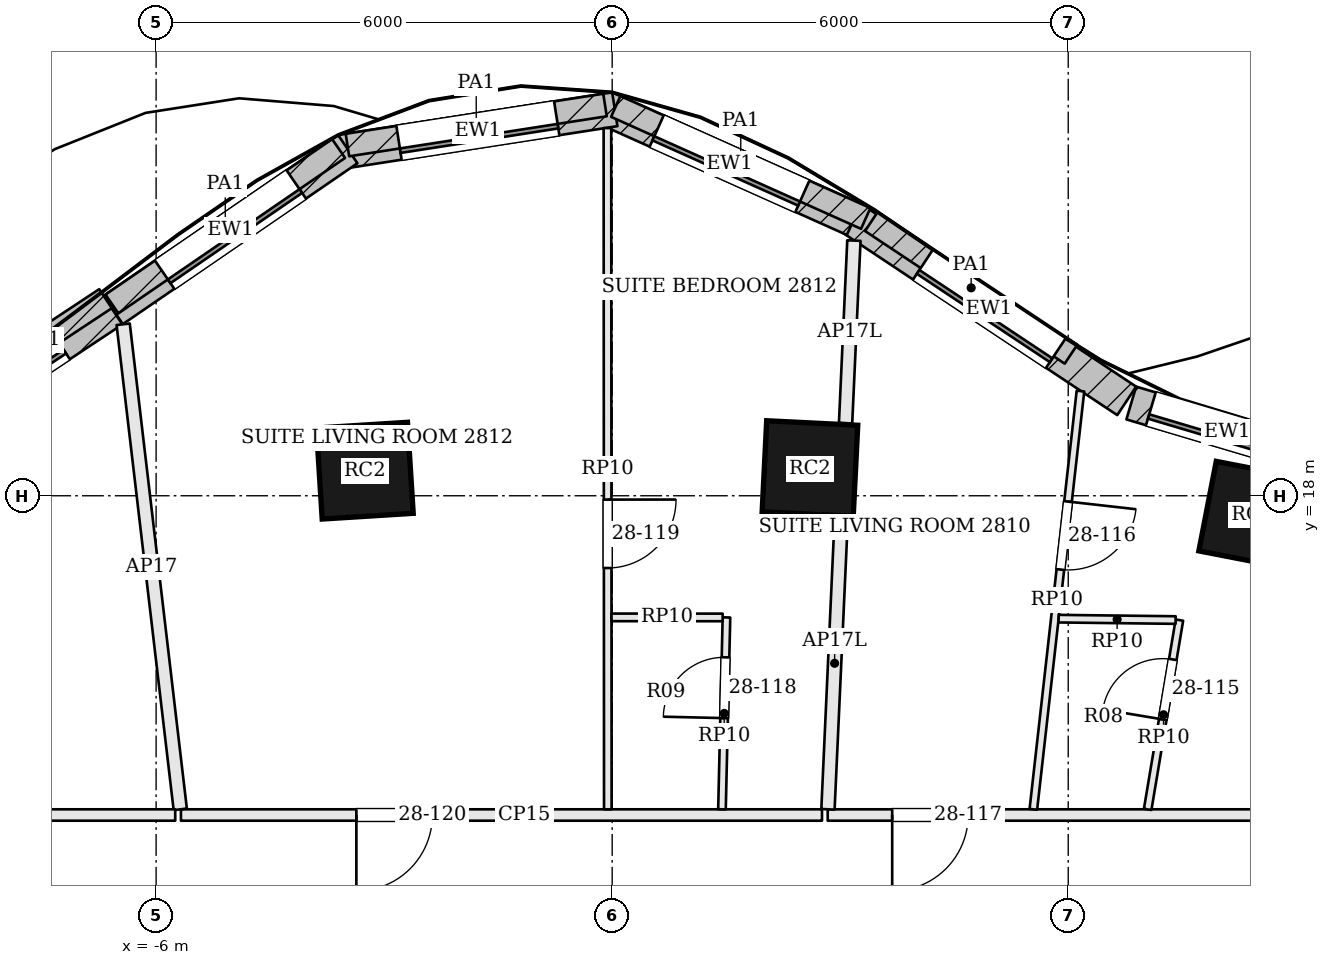
"""IFC4 building model, lengths in metres.
Left out: names, types, materials, properties, quantities, classifications, styles, units other than length and angle.
Written with IfcOpenShell. Run it as: python <this file> out.ifc"""

import sys

from ifc_helpers import new_model, si_unit, direction, frame, frame_2d, origin, origin_2d, place, context, subcontext, project, spatial, rectangle, extrude, element, fill, save


model = new_model("IFC4")
c1 = context("Model", 3, precision=1e-05, world=origin(), true_north=direction((0.0, 1.0)))
c2 = subcontext(c1, "Body", "Model", "MODEL_VIEW")
j1 = project(units=[si_unit("LENGTHUNIT", "METRE"), si_unit("PLANEANGLEUNIT", "RADIAN")], contexts=[c1])
p1 = place(None, origin())
s1 = spatial("IfcSite", under=j1, at=p1, CompositionType="ELEMENT")
p2 = place(p1, origin())
s2 = spatial("IfcBuilding", under=s1, at=p2, CompositionType="ELEMENT")
p3 = place(p2, frame((0.0, 0.0, 117.6)))
s3 = spatial("IfcBuildingStorey", under=s2, at=p3, CompositionType="ELEMENT", Elevation=117.6)
for number, where, z_axis, x_axis in (
    (1, (8.422, 17.749, 0.0), (0.0, 0.0, 1.0), (-0.982, 0.191, 0.0)),
    (2, (2.602, 18.358, 0.0), (0.0, 0.0, 1.0), (-0.999, 0.05, 0.0)),
    (3, (-3.254, 18.33, 0.0), (0.0, 0.0, 1.0), (-0.998, -0.063, 0.0)),
):
    element("IfcColumn", number, at=place(p3, frame(where, z_axis=z_axis, x_axis=x_axis)), inside=s3, PredefinedType="COLUMN", context=c2, shape_type="SweptSolid", body=[
        extrude(rectangle(XDim=1.2, YDim=1.2, at=origin_2d()), origin(), (0.0, 0.0, 1.0), 2.8),
    ])
p4 = place(p3, frame((9.357, 18.469, 0.0), z_axis=(0.0, 0.0, 1.0), x_axis=(-0.958524054629, 0.285011643091, 0.0)))
e4 = element("IfcWall", 4, at=p4, inside=s3, PredefinedType="SOLIDWALL", context=c2, shape_type="SweptSolid", body=[
    extrude(rectangle(XDim=2.637, YDim=0.45, at=frame_2d((1.319, 0.0))), origin(), (0.0, 0.0, 1.0), 3.3),
])
p5 = place(p4, frame((0.269, 0.0, 0.9)))
e5 = element("IfcOpeningElement", 5, at=p5, cuts=e4, PredefinedType="OPENING", context=c2, shape_type="SweptSolid", body=[
    extrude(rectangle(XDim=2.1, YDim=1.8, at=frame_2d((1.05, 0.9))), frame((0.0, 0.235, 0.0), z_axis=(0.0, -1.0, 0.0), x_axis=(1.0, 0.0, 0.0)), (0.0, 0.0, 1.0), 0.47),
])
p6 = place(p3, frame((6.769, 19.248, 0.0), z_axis=(0.0, 0.0, 1.0), x_axis=(-0.832973379274, 0.553313066375, 0.0)))
e6 = element("IfcWall", 6, at=p6, inside=s3, PredefinedType="SOLIDWALL", context=c2, shape_type="SweptSolid", body=[
    extrude(rectangle(XDim=4.348, YDim=0.45, at=frame_2d((2.174, 0.0))), origin(), (0.0, 0.0, 1.0), 3.3),
])
p7 = place(p6, frame((1.124, 0.0, 0.9)))
e7 = element("IfcOpeningElement", 7, at=p7, cuts=e6, PredefinedType="OPENING", context=c2, shape_type="SweptSolid", body=[
    extrude(rectangle(XDim=2.1, YDim=1.8, at=frame_2d((1.05, 0.9))), frame((0.0, 0.235, 0.0), z_axis=(0.0, -1.0, 0.0), x_axis=(1.0, 0.0, 0.0)), (0.0, 0.0, 1.0), 0.47),
])
p8 = place(p3, frame((3.179, 21.636, 0.0), z_axis=(0.0, 0.0, 1.0), x_axis=(-0.912608353595, 0.40883492139, 0.0)))
e8 = element("IfcWall", 8, at=p8, inside=s3, PredefinedType="SOLIDWALL", context=c2, shape_type="SweptSolid", body=[
    extrude(rectangle(XDim=3.585, YDim=0.45, at=frame_2d((1.792, 0.0))), origin(), (0.0, 0.0, 1.0), 3.3),
])
p9 = place(p8, frame((0.742, 0.0, 0.9)))
e9 = element("IfcOpeningElement", 9, at=p9, cuts=e8, PredefinedType="OPENING", context=c2, shape_type="SweptSolid", body=[
    extrude(rectangle(XDim=2.1, YDim=1.8, at=frame_2d((1.05, 0.9))), frame((0.0, 0.235, 0.0), z_axis=(0.0, -1.0, 0.0), x_axis=(1.0, 0.0, 0.0)), (0.0, 0.0, 1.0), 0.47),
])
p10 = place(p3, frame((0.035, 23.085, 0.0), z_axis=(0.0, 0.0, 1.0), x_axis=(-0.988133637562, -0.153596596054, 0.0)))
e10 = element("IfcWall", 10, at=p10, inside=s3, PredefinedType="SOLIDWALL", context=c2, shape_type="SweptSolid", body=[
    extrude(rectangle(XDim=3.646, YDim=0.45, at=frame_2d((1.823, 0.0))), origin(), (0.0, 0.0, 1.0), 3.3),
])
p11 = place(p10, frame((0.773, 0.0, 0.9)))
e11 = element("IfcOpeningElement", 11, at=p11, cuts=e10, PredefinedType="OPENING", context=c2, shape_type="SweptSolid", body=[
    extrude(rectangle(XDim=2.1, YDim=1.8, at=frame_2d((1.05, 0.9))), frame((0.0, 0.235, 0.0), z_axis=(0.0, -1.0, 0.0), x_axis=(1.0, 0.0, 0.0)), (0.0, 0.0, 1.0), 0.47),
])
p12 = place(p3, frame((-3.479, 22.56, 0.0), z_axis=(0.0, 0.0, 1.0), x_axis=(-0.824722766417, -0.565537230033, 0.0)))
e12 = element("IfcWall", 12, at=p12, inside=s3, PredefinedType="SOLIDWALL", context=c2, shape_type="SweptSolid", body=[
    extrude(rectangle(XDim=3.742, YDim=0.45, at=frame_2d((1.871, 0.0))), origin(), (0.0, 0.0, 1.0), 3.3),
])
p13 = place(p12, frame((0.821, 0.0, 0.9)))
e13 = element("IfcOpeningElement", 13, at=p13, cuts=e12, PredefinedType="OPENING", context=c2, shape_type="SweptSolid", body=[
    extrude(rectangle(XDim=2.1, YDim=1.8, at=frame_2d((1.05, 0.9))), frame((0.0, 0.235, 0.0), z_axis=(0.0, -1.0, 0.0), x_axis=(1.0, 0.0, 0.0)), (0.0, 0.0, 1.0), 0.47),
])
p14 = place(p3, frame((-6.568, 20.441, 0.0), z_axis=(0.0, 0.0, 1.0), x_axis=(-0.834034214531, -0.551712723246, 0.0)))
e14 = element("IfcWall", 14, at=p14, inside=s3, PredefinedType="SOLIDWALL", context=c2, shape_type="SweptSolid", body=[
    extrude(rectangle(XDim=3.757, YDim=0.45, at=frame_2d((1.879, 0.0))), origin(), (0.0, 0.0, 1.0), 3.3),
])
p15 = place(p14, frame((0.829, 0.0, 0.9)))
e15 = element("IfcOpeningElement", 15, at=p15, cuts=e14, PredefinedType="OPENING", context=c2, shape_type="SweptSolid", body=[
    extrude(rectangle(XDim=2.1, YDim=1.8, at=frame_2d((1.05, 0.9))), frame((0.0, 0.235, 0.0), z_axis=(0.0, -1.0, 0.0), x_axis=(1.0, 0.0, 0.0)), (0.0, 0.0, 1.0), 0.47),
])
p16 = place(p3, frame((6.037, 19.863, 3.6), z_axis=(0.0, 0.0, 1.0), x_axis=(-0.832989992548, 0.553288055459, 0.0)))
e16 = element("IfcWall", 16, at=p16, inside=s3, PredefinedType="PARAPET", context=c2, shape_type="SweptSolid", body=[
    extrude(rectangle(XDim=3.154, YDim=0.3, at=frame_2d((1.577, 0.0))), origin(), (0.0, 0.0, 1.0), 1.1),
])
p17 = place(p3, frame((3.336, 21.648, 3.6), z_axis=(0.0, 0.0, 1.0), x_axis=(-0.912617427268, 0.40881466638, 0.0)))
e17 = element("IfcWall", 17, at=p17, inside=s3, PredefinedType="PARAPET", context=c2, shape_type="SweptSolid", body=[
    extrude(rectangle(XDim=3.604, YDim=0.3, at=frame_2d((1.802, 0.0))), origin(), (0.0, 0.0, 1.0), 1.1),
])
p18 = place(p3, frame((-0.094, 23.14, 3.6), z_axis=(0.0, 0.0, 1.0), x_axis=(-0.988150084887, -0.153490748056, 0.0)))
e18 = element("IfcWall", 18, at=p18, inside=s3, PredefinedType="PARAPET", context=c2, shape_type="SweptSolid", body=[
    extrude(rectangle(XDim=3.429, YDim=0.3, at=frame_2d((1.715, 0.0))), origin(), (0.0, 0.0, 1.0), 1.1),
])
p19 = place(p3, frame((-3.599, 22.568, 3.6), z_axis=(0.0, 0.0, 1.0), x_axis=(-0.82476034254, -0.565482428881, 0.0)))
e19 = element("IfcWall", 19, at=p19, inside=s3, PredefinedType="PARAPET", context=c2, shape_type="SweptSolid", body=[
    extrude(rectangle(XDim=3.616, YDim=0.3, at=frame_2d((1.808, 0.0))), origin(), (0.0, 0.0, 1.0), 1.1),
])
p20 = place(p3, frame((-6.665, 20.593, 3.6), z_axis=(0.0, 0.0, 1.0), x_axis=(-0.834081514068, -0.551641213008, 0.0)))
e20 = element("IfcWall", 20, at=p20, inside=s3, PredefinedType="PARAPET", context=c2, shape_type="SweptSolid", body=[
    extrude(rectangle(XDim=1.991, YDim=0.3, at=frame_2d((0.996, 0.0))), origin(), (0.0, 0.0, 1.0), 1.1),
])
p21 = place(p3, frame((14.725, 13.8, 0.0), z_axis=(0.0, 0.0, 1.0), x_axis=(-1.0, 0.0, 0.0)))
e21 = element("IfcWall", 21, at=p21, inside=s3, PredefinedType="PARTITIONING", context=c2, shape_type="SweptSolid", body=[
    extrude(rectangle(XDim=11.889, YDim=0.15, at=frame_2d((5.945, 0.0))), origin(), (0.0, 0.0, 1.0), 2.684),
])
p22 = place(p21, frame((10.041, 0.0, 0.0)))
e22 = element("IfcOpeningElement", 22, at=p22, cuts=e21, PredefinedType="OPENING", context=c2, shape_type="SweptSolid", body=[
    extrude(rectangle(XDim=1.0, YDim=2.1, at=frame_2d((0.5, 1.05))), frame((0.0, 0.085, 0.0), z_axis=(0.0, -1.0, 0.0), x_axis=(1.0, 0.0, 0.0)), (0.0, 0.0, 1.0), 0.17),
])
p23 = place(p3, frame((3.18, 21.357, 0.0), z_axis=(0.0, 0.0, 1.0), x_axis=(-0.045591899448, -0.998960148707, 0.0)))
e23 = element("IfcWall", 23, at=p23, inside=s3, PredefinedType="PARTITIONING", context=c2, shape_type="SweptSolid", body=[
    extrude(rectangle(XDim=2.404, YDim=0.175, at=frame_2d((1.202, 0.0))), origin(), (0.0, 0.0, 1.0), 2.28),
])
p24 = place(p3, frame((3.014, 17.717, 0.0), z_axis=(0.0, 0.0, 1.0), x_axis=(-0.045517086473, -0.998963560316, 0.0)))
e24 = element("IfcWall", 24, at=p24, inside=s3, PredefinedType="PARTITIONING", context=c2, shape_type="SweptSolid", body=[
    extrude(rectangle(XDim=3.846, YDim=0.175, at=frame_2d((1.923, 0.0))), origin(), (0.0, 0.0, 1.0), 2.28),
])
p25 = place(p3, frame((2.76, 13.8, 0.0), z_axis=(0.0, 0.0, 1.0), x_axis=(-1.0, 0.0, 0.0)))
e25 = element("IfcWall", 25, at=p25, inside=s3, PredefinedType="PARTITIONING", context=c2, shape_type="SweptSolid", body=[
    extrude(rectangle(XDim=8.434, YDim=0.15, at=frame_2d((4.217, 0.0))), origin(), (0.0, 0.0, 1.0), 2.684),
])
p26 = place(p25, frame((5.126, 0.0, 0.0)))
e26 = element("IfcOpeningElement", 26, at=p26, cuts=e25, PredefinedType="OPENING", context=c2, shape_type="SweptSolid", body=[
    extrude(rectangle(XDim=1.0, YDim=2.1, at=frame_2d((0.5, 1.05))), frame((0.0, 0.085, 0.0), z_axis=(0.0, -1.0, 0.0), x_axis=(1.0, 0.0, 0.0)), (0.0, 0.0, 1.0), 0.17),
])
p27 = place(p3, frame((-6.433, 20.256, 0.0), z_axis=(0.0, 0.0, 1.0), x_axis=(0.116872110209, -0.993146972938, 0.0)))
e27 = element("IfcWall", 27, at=p27, inside=s3, PredefinedType="PARTITIONING", context=c2, shape_type="SweptSolid", body=[
    extrude(rectangle(XDim=6.426, YDim=0.175, at=frame_2d((3.213, 0.0))), origin(), (0.0, 0.0, 1.0), 2.684),
])
p28 = place(p3, frame((-5.749, 13.8, 0.0), z_axis=(0.0, 0.0, 1.0), x_axis=(-1.0, 0.0, 0.0)))
e28 = element("IfcWall", 28, at=p28, inside=s3, PredefinedType="PARTITIONING", context=c2, shape_type="SweptSolid", body=[
    extrude(rectangle(XDim=9.052, YDim=0.15, at=frame_2d((4.526, 0.0))), origin(), (0.0, 0.0, 1.0), 2.684),
])
p29 = place(p3, frame((6.161, 19.377, 0.0), z_axis=(0.0, 0.0, 1.0), x_axis=(-0.11193626313, -0.993715388326, 0.0)))
e29 = element("IfcWall", 29, at=p29, inside=s3, PredefinedType="PARTITIONING", context=c2, shape_type="SweptSolid", body=[
    extrude(rectangle(XDim=5.538, YDim=0.1, at=frame_2d((2.769, 0.0))), origin(), (0.0, 0.0, 1.0), 2.684),
])
p30 = place(p29, frame((1.463, 0.0, 0.0)))
e30 = element("IfcOpeningElement", 30, at=p30, cuts=e29, PredefinedType="OPENING", context=c2, shape_type="SweptSolid", body=[
    extrude(rectangle(XDim=0.9, YDim=2.4, at=frame_2d((0.45, 1.2))), frame((0.0, 0.06, 0.0), z_axis=(0.0, -1.0, 0.0), x_axis=(1.0, 0.0, 0.0)), (0.0, 0.0, 1.0), 0.12),
])
p31 = place(p3, frame((7.045, 13.874, 0.0), z_axis=(0.0, 0.0, 1.0), x_axis=(0.165339678844, 0.986236680823, 0.0)))
e31 = element("IfcWall", 31, at=p31, inside=s3, PredefinedType="PARTITIONING", context=c2, shape_type="SweptSolid", body=[
    extrude(rectangle(XDim=2.525, YDim=0.1, at=frame_2d((1.262, 0.0))), origin(), (0.0, 0.0, 1.0), 2.684),
])
p32 = place(p31, frame((1.2, 0.0, 0.0)))
e32 = element("IfcOpeningElement", 32, at=p32, cuts=e31, PredefinedType="OPENING", context=c2, shape_type="SweptSolid", body=[
    extrude(rectangle(XDim=0.8, YDim=2.1, at=frame_2d((0.4, 1.05))), frame((0.0, 0.06, 0.0), z_axis=(0.0, -1.0, 0.0), x_axis=(1.0, 0.0, 0.0)), (0.0, 0.0, 1.0), 0.12),
])
p33 = place(p3, frame((7.413, 16.365, 0.0), z_axis=(0.0, 0.0, 1.0), x_axis=(-0.999929213278, 0.011898253371, 0.0)))
e33 = element("IfcWall", 33, at=p33, inside=s3, PredefinedType="PARTITIONING", context=c2, shape_type="SweptSolid", body=[
    extrude(rectangle(XDim=1.539, YDim=0.1, at=frame_2d((0.77, 0.0))), origin(), (0.0, 0.0, 1.0), 2.684),
])
p34 = place(p3, frame((-0.062, 22.837, 0.0), z_axis=(0.0, 0.0, 1.0), x_axis=(0.000599291639, -0.999999820425, 0.0)))
e34 = element("IfcWall", 34, at=p34, inside=s3, PredefinedType="PARTITIONING", context=c2, shape_type="SweptSolid", body=[
    extrude(rectangle(XDim=8.962, YDim=0.1, at=frame_2d((4.481, 0.0))), origin(), (0.0, 0.0, 1.0), 2.684),
])
p35 = place(p34, frame((4.888, 0.0, 0.0)))
e35 = element("IfcOpeningElement", 35, at=p35, cuts=e34, PredefinedType="OPENING", context=c2, shape_type="SweptSolid", body=[
    extrude(rectangle(XDim=0.9, YDim=2.4, at=frame_2d((0.45, 1.2))), frame((0.0, 0.06, 0.0), z_axis=(0.0, -1.0, 0.0), x_axis=(1.0, 0.0, 0.0)), (0.0, 0.0, 1.0), 0.12),
])
p36 = place(p3, frame((1.445, 13.875, 0.0), z_axis=(0.0, 0.0, 1.0), x_axis=(0.023301215285, 0.999728489824, 0.0)))
e36 = element("IfcWall", 36, at=p36, inside=s3, PredefinedType="PARTITIONING", context=c2, shape_type="SweptSolid", body=[
    extrude(rectangle(XDim=2.525, YDim=0.1, at=frame_2d((1.263, 0.0))), origin(), (0.0, 0.0, 1.0), 2.684),
])
p37 = place(p36, frame((1.2, 0.0, 0.0)))
e37 = element("IfcOpeningElement", 37, at=p37, cuts=e36, PredefinedType="OPENING", context=c2, shape_type="SweptSolid", body=[
    extrude(rectangle(XDim=0.8, YDim=2.1, at=frame_2d((0.4, 1.05))), frame((0.0, 0.06, 0.0), z_axis=(0.0, -1.0, 0.0), x_axis=(1.0, 0.0, 0.0)), (0.0, 0.0, 1.0), 0.12),
])
p38 = place(p3, frame((1.454, 16.399, 0.0), z_axis=(0.0, 0.0, 1.0), x_axis=(-0.999999944259, 0.000333889798, 0.0)))
e38 = element("IfcWall", 38, at=p38, inside=s3, PredefinedType="PARTITIONING", context=c2, shape_type="SweptSolid", body=[
    extrude(rectangle(XDim=1.462, YDim=0.1, at=frame_2d((0.731, 0.0))), origin(), (0.0, 0.0, 1.0), 2.684),
])
p39 = place(p5, origin())
e39 = element("IfcWindow", 39, at=p39, inside=s3, PartitioningType="SINGLE_PANEL", PredefinedType="WINDOW", context=c2, shape_type="SweptSolid", body=[
    extrude(rectangle(XDim=2.1, YDim=1.8, at=frame_2d((1.05, 0.9))), frame((0.0, 0.135, 0.0), z_axis=(0.0, -1.0, 0.0), x_axis=(1.0, 0.0, 0.0)), (0.0, 0.0, 1.0), 0.06),
])
fill(e5, e39)
p40 = place(p7, origin())
e40 = element("IfcWindow", 40, at=p40, inside=s3, PartitioningType="SINGLE_PANEL", PredefinedType="WINDOW", context=c2, shape_type="SweptSolid", body=[
    extrude(rectangle(XDim=2.1, YDim=1.8, at=frame_2d((1.05, 0.9))), frame((0.0, 0.135, 0.0), z_axis=(0.0, -1.0, 0.0), x_axis=(1.0, 0.0, 0.0)), (0.0, 0.0, 1.0), 0.06),
])
fill(e7, e40)
p41 = place(p9, origin())
e41 = element("IfcWindow", 41, at=p41, inside=s3, PartitioningType="SINGLE_PANEL", PredefinedType="WINDOW", context=c2, shape_type="SweptSolid", body=[
    extrude(rectangle(XDim=2.1, YDim=1.8, at=frame_2d((1.05, 0.9))), frame((0.0, 0.135, 0.0), z_axis=(0.0, -1.0, 0.0), x_axis=(1.0, 0.0, 0.0)), (0.0, 0.0, 1.0), 0.06),
])
fill(e9, e41)
p42 = place(p11, origin())
e42 = element("IfcWindow", 42, at=p42, inside=s3, PartitioningType="SINGLE_PANEL", PredefinedType="WINDOW", context=c2, shape_type="SweptSolid", body=[
    extrude(rectangle(XDim=2.1, YDim=1.8, at=frame_2d((1.05, 0.9))), frame((0.0, 0.135, 0.0), z_axis=(0.0, -1.0, 0.0), x_axis=(1.0, 0.0, 0.0)), (0.0, 0.0, 1.0), 0.06),
])
fill(e11, e42)
p43 = place(p13, origin())
e43 = element("IfcWindow", 43, at=p43, inside=s3, PartitioningType="SINGLE_PANEL", PredefinedType="WINDOW", context=c2, shape_type="SweptSolid", body=[
    extrude(rectangle(XDim=2.1, YDim=1.8, at=frame_2d((1.05, 0.9))), frame((0.0, 0.135, 0.0), z_axis=(0.0, -1.0, 0.0), x_axis=(1.0, 0.0, 0.0)), (0.0, 0.0, 1.0), 0.06),
])
fill(e13, e43)
p44 = place(p15, origin())
e44 = element("IfcWindow", 44, at=p44, inside=s3, PartitioningType="SINGLE_PANEL", PredefinedType="WINDOW", context=c2, shape_type="SweptSolid", body=[
    extrude(rectangle(XDim=2.1, YDim=1.8, at=frame_2d((1.05, 0.9))), frame((0.0, 0.135, 0.0), z_axis=(0.0, -1.0, 0.0), x_axis=(1.0, 0.0, 0.0)), (0.0, 0.0, 1.0), 0.06),
])
fill(e15, e44)
p45 = place(p32, origin())
e45 = element("IfcDoor", 45, at=p45, inside=s3, OperationType="SINGLE_SWING_LEFT", PredefinedType="DOOR", context=c2, shape_type="SweptSolid", body=[
    extrude(rectangle(XDim=0.8, YDim=2.1, at=frame_2d((0.4, 1.05))), frame((0.0, 0.025, 0.0), z_axis=(0.0, -1.0, 0.0), x_axis=(1.0, 0.0, 0.0)), (0.0, 0.0, 1.0), 0.05),
])
fill(e32, e45)
p46 = place(p30, origin())
e46 = element("IfcDoor", 46, at=p46, inside=s3, OperationType="SINGLE_SWING_LEFT", PredefinedType="DOOR", context=c2, shape_type="SweptSolid", body=[
    extrude(rectangle(XDim=0.9, YDim=2.4, at=frame_2d((0.45, 1.2))), frame((0.0, 0.025, 0.0), z_axis=(0.0, -1.0, 0.0), x_axis=(1.0, 0.0, 0.0)), (0.0, 0.0, 1.0), 0.05),
])
fill(e30, e46)
p47 = place(p22, origin())
e47 = element("IfcDoor", 47, at=p47, inside=s3, OperationType="SINGLE_SWING_RIGHT", PredefinedType="DOOR", context=c2, shape_type="SweptSolid", body=[
    extrude(rectangle(XDim=1.0, YDim=2.1, at=frame_2d((0.5, 1.05))), frame((0.0, 0.025, 0.0), z_axis=(0.0, -1.0, 0.0), x_axis=(1.0, 0.0, 0.0)), (0.0, 0.0, 1.0), 0.05),
])
fill(e22, e47)
p48 = place(p37, origin())
e48 = element("IfcDoor", 48, at=p48, inside=s3, OperationType="SINGLE_SWING_LEFT", PredefinedType="DOOR", context=c2, shape_type="SweptSolid", body=[
    extrude(rectangle(XDim=0.8, YDim=2.1, at=frame_2d((0.4, 1.05))), frame((0.0, 0.025, 0.0), z_axis=(0.0, -1.0, 0.0), x_axis=(1.0, 0.0, 0.0)), (0.0, 0.0, 1.0), 0.05),
])
fill(e37, e48)
p49 = place(p35, origin())
e49 = element("IfcDoor", 49, at=p49, inside=s3, OperationType="SINGLE_SWING_LEFT", PredefinedType="DOOR", context=c2, shape_type="SweptSolid", body=[
    extrude(rectangle(XDim=0.9, YDim=2.4, at=frame_2d((0.45, 1.2))), frame((0.0, 0.025, 0.0), z_axis=(0.0, -1.0, 0.0), x_axis=(1.0, 0.0, 0.0)), (0.0, 0.0, 1.0), 0.05),
])
fill(e35, e49)
p50 = place(p26, origin())
e50 = element("IfcDoor", 50, at=p50, inside=s3, OperationType="SINGLE_SWING_RIGHT", PredefinedType="DOOR", context=c2, shape_type="SweptSolid", body=[
    extrude(rectangle(XDim=1.0, YDim=2.1, at=frame_2d((0.5, 1.05))), frame((0.0, 0.025, 0.0), z_axis=(0.0, -1.0, 0.0), x_axis=(1.0, 0.0, 0.0)), (0.0, 0.0, 1.0), 0.05),
])
fill(e26, e50)
save(model, sys.argv[1])
